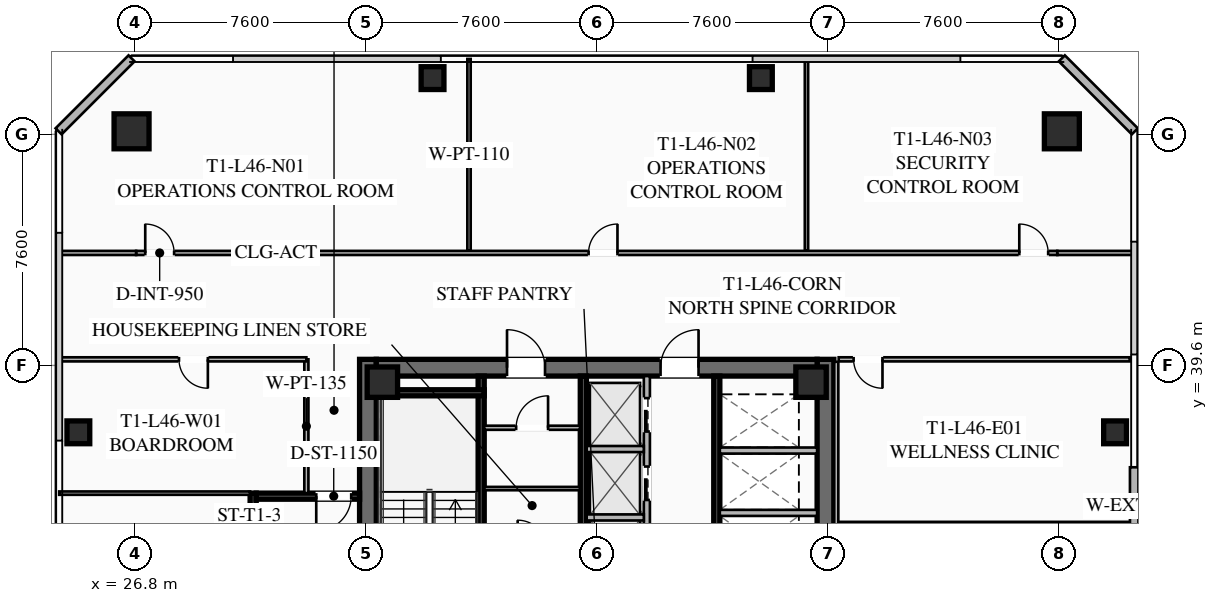
"""IFC4 building model, lengths in metres.
Left out: names, types, materials, properties, quantities, classifications, styles, units other than length and angle.
Written with IfcOpenShell. Run it as: python <this file> out.ifc"""

import sys

from ifc_helpers import new_model, si_unit, direction, frame, frame_2d, origin, origin_2d, place, context, subcontext, project, spatial, rectangle, hollow_rectangle, extrude, element, fill, save


model = new_model("IFC4")
c1 = context("Model", 3, precision=1e-05, world=origin(), true_north=direction((0.0, 1.0)))
c2 = subcontext(c1, "Body", "Model", "MODEL_VIEW")
j1 = project(units=[si_unit("LENGTHUNIT", "METRE"), si_unit("PLANEANGLEUNIT", "RADIAN")], contexts=[c1])
p1 = place(None, origin())
s1 = spatial("IfcSite", under=j1, at=p1, CompositionType="ELEMENT")
p2 = place(p1, origin())
s2 = spatial("IfcBuilding", under=s1, at=p2, CompositionType="ELEMENT")
p3 = place(p2, frame((0.0, 0.0, 171.2)))
s3 = spatial("IfcBuildingStorey", under=s2, at=p3, CompositionType="ELEMENT", Elevation=171.2)
for number, where, z_axis, x_axis in (
    (1, (34.475, 24.2, 0.0), (0.0, 0.0, 1.0), (0.0, 1.0, 0.0)),
    (2, (49.525, 39.8, 0.0), (0.0, 0.0, 1.0), (0.0, -1.0, 0.0)),
):
    element("IfcWall", number, at=place(p3, frame(where, z_axis=z_axis, x_axis=x_axis)), inside=s3, PredefinedType="SHEAR", context=c2, shape_type="SweptSolid", body=[
        extrude(rectangle(XDim=15.6, YDim=0.55, at=frame_2d((7.8, 0.0))), origin(), (0.0, 0.0, 1.0), 3.55),
    ])
p4 = place(p3, frame((34.75, 39.525, 0.0), z_axis=(0.0, 0.0, 1.0), x_axis=(1.0, 0.0, 0.0)))
e3 = element("IfcWall", 3, at=p4, inside=s3, PredefinedType="SHEAR", context=c2, shape_type="SweptSolid", body=[
    extrude(rectangle(XDim=14.5, YDim=0.55, at=frame_2d((7.25, 0.0))), origin(), (0.0, 0.0, 1.0), 3.55),
])
p5 = place(p4, frame((4.3, 0.0, 0.0)))
e4 = element("IfcOpeningElement", 4, at=p5, cuts=e3, PredefinedType="OPENING", context=c2, shape_type="SweptSolid", body=[
    extrude(rectangle(XDim=1.25, YDim=2.25, at=frame_2d((0.625, 1.125))), frame((0.0, 0.285, 0.0), z_axis=(0.0, -1.0, 0.0), x_axis=(1.0, 0.0, 0.0)), (0.0, 0.0, 1.0), 0.57),
])
p6 = place(p4, frame((9.35, 0.0, 0.0)))
e5 = element("IfcOpeningElement", 5, at=p6, cuts=e3, PredefinedType="OPENING", context=c2, shape_type="SweptSolid", body=[
    extrude(rectangle(XDim=1.25, YDim=2.25, at=frame_2d((0.625, 1.125))), frame((0.0, 0.285, 0.0), z_axis=(0.0, -1.0, 0.0), x_axis=(1.0, 0.0, 0.0)), (0.0, 0.0, 1.0), 0.57),
])
for number, where, z_axis, x_axis in (
    (6, (49.05, 39.05, 0.0), (0.0, 0.0, 1.0), (1.0, 0.0, 0.0)),
    (7, (34.95, 39.05, 0.0), (0.0, 0.0, 1.0), (1.0, 0.0, 0.0)),
):
    element("IfcColumn", number, at=place(p3, frame(where, z_axis=z_axis, x_axis=x_axis)), inside=s3, PredefinedType="COLUMN", context=c2, shape_type="SweptSolid", body=[
        extrude(hollow_rectangle(XDim=1.0, YDim=1.0, WallThickness=0.04, at=origin_2d()), origin(), (0.0, 0.0, 1.0), 3.37),
    ])
for number, where, z_axis, x_axis in (
    (8, (57.3, 47.3, 0.0), (0.0, 0.0, 1.0), (1.0, 0.0, 0.0)),
    (9, (26.7, 47.3, 0.0), (0.0, 0.0, 1.0), (1.0, 0.0, 0.0)),
):
    element("IfcColumn", number, at=place(p3, frame(where, z_axis=z_axis, x_axis=x_axis)), inside=s3, PredefinedType="COLUMN", context=c2, shape_type="SweptSolid", body=[
        extrude(hollow_rectangle(XDim=1.15, YDim=1.15, WallThickness=0.045, at=origin_2d()), origin(), (0.0, 0.0, 1.0), 3.37),
    ])
for number, where, z_axis, x_axis in (
    (10, (59.05, 37.4, 0.0), (0.0, 0.0, 1.0), (1.0, 0.0, 0.0)),
    (11, (47.4, 49.05, 0.0), (0.0, 0.0, 1.0), (1.0, 0.0, 0.0)),
    (12, (36.6, 49.05, 0.0), (0.0, 0.0, 1.0), (1.0, 0.0, 0.0)),
    (13, (24.95, 37.4, 0.0), (0.0, 0.0, 1.0), (1.0, 0.0, 0.0)),
):
    element("IfcColumn", number, at=place(p3, frame(where, z_axis=z_axis, x_axis=x_axis)), inside=s3, PredefinedType="COLUMN", context=c2, shape_type="SweptSolid", body=[
        extrude(hollow_rectangle(XDim=0.75, YDim=0.75, WallThickness=0.032, at=origin_2d()), origin(), (0.0, 0.0, 1.0), 3.37),
    ])
p7 = place(p3, frame((59.68, 36.25, 0.0), z_axis=(0.0, 0.0, 1.0), x_axis=(0.0, -1.0, 0.0)))
e14 = element("IfcWall", 14, at=p7, inside=s3, PredefinedType="SOLIDWALL", context=c2, shape_type="SweptSolid", body=[
    extrude(rectangle(XDim=8.5, YDim=0.28, at=frame_2d((4.25, 0.0))), origin(), (0.0, 0.0, 1.0), 3.37),
])
p8 = place(p7, frame((3.6, 0.0, 0.0)))
e15 = element("IfcOpeningElement", 15, at=p8, cuts=e14, PredefinedType="OPENING", context=c2, shape_type="SweptSolid", body=[
    extrude(rectangle(XDim=1.3, YDim=2.15, at=frame_2d((0.65, 1.075))), frame((0.0, 0.15, 0.0), z_axis=(0.0, -1.0, 0.0), x_axis=(1.0, 0.0, 0.0)), (0.0, 0.0, 1.0), 0.3),
])
p9 = place(p7, frame((5.24, 0.0, 0.85)))
e16 = element("IfcOpeningElement", 16, at=p9, cuts=e14, PredefinedType="OPENING", context=c2, shape_type="SweptSolid", body=[
    extrude(rectangle(XDim=1.8, YDim=1.92, at=frame_2d((0.9, 0.96))), frame((0.0, 0.15, 0.0), z_axis=(0.0, -1.0, 0.0), x_axis=(1.0, 0.0, 0.0)), (0.0, 0.0, 1.0), 0.3),
])
for number, where, z_axis, x_axis in (
    (17, (24.3, 47.3, 0.0), (0.0, 0.0, 1.0), (0.707, 0.707, 0.0)),
    (18, (57.3, 49.7, 0.0), (0.0, 0.0, 1.0), (0.707, -0.707, 0.0)),
):
    element("IfcWall", number, at=place(p3, frame(where, z_axis=z_axis, x_axis=x_axis)), inside=s3, PredefinedType="SOLIDWALL", context=c2, shape_type="SweptSolid", body=[
        extrude(rectangle(XDim=3.394, YDim=0.28, at=frame_2d((1.697, 0.0))), origin(), (0.0, 0.0, 1.0), 3.37),
    ])
p10 = place(p3, frame((38.2, 31.2, 0.0), z_axis=(0.0, 0.0, 1.0), x_axis=(0.0, 1.0, 0.0)))
e19 = element("IfcWall", 19, at=p10, inside=s3, PredefinedType="SHEAR", context=c2, shape_type="SweptSolid", body=[
    extrude(rectangle(XDim=8.05, YDim=0.2, at=frame_2d((4.025, 0.0))), origin(), (0.0, 0.0, 1.0), 3.37),
])
p11 = place(p10, frame((0.45, 0.0, 0.0)))
e20 = element("IfcOpeningElement", 20, at=p11, cuts=e19, PredefinedType="OPENING", context=c2, shape_type="SweptSolid", body=[
    extrude(rectangle(XDim=1.15, YDim=2.2, at=frame_2d((0.575, 1.1))), frame((0.0, 0.11, 0.0), z_axis=(0.0, -1.0, 0.0), x_axis=(1.0, 0.0, 0.0)), (0.0, 0.0, 1.0), 0.22),
])
p12 = place(p3, frame((34.75, 38.7, 0.0), z_axis=(0.0, 0.0, 1.0), x_axis=(1.0, 0.0, 0.0)))
e21 = element("IfcWall", 21, at=p12, inside=s3, PredefinedType="SHEAR", context=c2, shape_type="SweptSolid", body=[
    extrude(rectangle(XDim=3.55, YDim=0.2, at=frame_2d((1.775, 0.0))), origin(), (0.0, 0.0, 1.0), 3.37),
])
p13 = place(p3, frame((41.56, 24.75, 0.0), z_axis=(0.0, 0.0, 1.0), x_axis=(0.0, 1.0, 0.0)))
e22 = element("IfcWall", 22, at=p13, inside=s3, PredefinedType="SHEAR", context=c2, shape_type="SweptSolid", body=[
    extrude(rectangle(XDim=14.5, YDim=0.2, at=frame_2d((7.25, 0.0))), origin(), (0.0, 0.0, 1.0), 3.37),
])
p14 = place(p3, frame((45.95, 39.25, 0.0), z_axis=(0.0, 0.0, 1.0), x_axis=(0.0, -1.0, 0.0)))
e23 = element("IfcWall", 23, at=p14, inside=s3, PredefinedType="SHEAR", context=c2, shape_type="SweptSolid", body=[
    extrude(rectangle(XDim=6.45, YDim=0.2, at=frame_2d((3.225, 0.0))), origin(), (0.0, 0.0, 1.0), 3.37),
])
for number, where, z_axis, x_axis in (
    (24, (46.05, 34.75, 0.0), (0.0, 0.0, 1.0), (1.0, 0.0, 0.0)),
    (25, (46.05, 36.8, 0.0), (0.0, 0.0, 1.0), (1.0, 0.0, 0.0)),
):
    element("IfcWall", number, at=place(p3, frame(where, z_axis=z_axis, x_axis=x_axis)), inside=s3, PredefinedType="SOLIDWALL", context=c2, shape_type="SweptSolid", body=[
        extrude(rectangle(XDim=3.2, YDim=0.2, at=frame_2d((1.6, 0.0))), origin(), (0.0, 0.0, 1.0), 3.37),
    ])
p15 = place(p3, frame((38.3, 37.55, 0.0), z_axis=(0.0, 0.0, 1.0), x_axis=(1.0, 0.0, 0.0)))
e26 = element("IfcWall", 26, at=p15, inside=s3, PredefinedType="PARTITIONING", context=c2, shape_type="SweptSolid", body=[
    extrude(rectangle(XDim=3.15, YDim=0.135, at=frame_2d((1.575, 0.0))), origin(), (0.0, 0.0, 1.0), 2.723),
])
p16 = place(p15, frame((1.05, 0.0, 0.0)))
e27 = element("IfcOpeningElement", 27, at=p16, cuts=e26, PredefinedType="OPENING", context=c2, shape_type="SweptSolid", body=[
    extrude(rectangle(XDim=1.05, YDim=2.2, at=frame_2d((0.525, 1.1))), frame((0.0, 0.077, 0.0), z_axis=(0.0, -1.0, 0.0), x_axis=(1.0, 0.0, 0.0)), (0.0, 0.0, 1.0), 0.155),
])
p17 = place(p3, frame((38.3, 35.55, 0.0), z_axis=(0.0, 0.0, 1.0), x_axis=(1.0, 0.0, 0.0)))
e28 = element("IfcWall", 28, at=p17, inside=s3, PredefinedType="PARTITIONING", context=c2, shape_type="SweptSolid", body=[
    extrude(rectangle(XDim=3.15, YDim=0.11, at=frame_2d((1.575, 0.0))), origin(), (0.0, 0.0, 1.0), 2.723),
])
p18 = place(p3, frame((43.65, 32.35, 0.0), z_axis=(0.0, 0.0, 1.0), x_axis=(0.0, 1.0, 0.0)))
e29 = element("IfcWall", 29, at=p18, inside=s3, PredefinedType="SOLIDWALL", context=c2, shape_type="SweptSolid", body=[
    extrude(rectangle(XDim=6.9, YDim=0.2, at=frame_2d((3.45, 0.0))), origin(), (0.0, 0.0, 1.0), 3.37),
])
p19 = place(p18, frame((0.575, 0.0, 0.0)))
e30 = element("IfcOpeningElement", 30, at=p19, cuts=e29, PredefinedType="OPENING", context=c2, shape_type="SweptSolid", body=[
    extrude(rectangle(XDim=1.1, YDim=2.2, at=frame_2d((0.55, 1.1))), frame((0.0, 0.11, 0.0), z_axis=(0.0, -1.0, 0.0), x_axis=(1.0, 0.0, 0.0)), (0.0, 0.0, 1.0), 0.22),
])
p20 = place(p18, frame((2.825, 0.0, 0.0)))
e31 = element("IfcOpeningElement", 31, at=p20, cuts=e29, PredefinedType="OPENING", context=c2, shape_type="SweptSolid", body=[
    extrude(rectangle(XDim=1.1, YDim=2.2, at=frame_2d((0.55, 1.1))), frame((0.0, 0.11, 0.0), z_axis=(0.0, -1.0, 0.0), x_axis=(1.0, 0.0, 0.0)), (0.0, 0.0, 1.0), 0.22),
])
p21 = place(p18, frame((5.075, 0.0, 0.0)))
e32 = element("IfcOpeningElement", 32, at=p21, cuts=e29, PredefinedType="OPENING", context=c2, shape_type="SweptSolid", body=[
    extrude(rectangle(XDim=1.1, YDim=2.2, at=frame_2d((0.55, 1.1))), frame((0.0, 0.11, 0.0), z_axis=(0.0, -1.0, 0.0), x_axis=(1.0, 0.0, 0.0)), (0.0, 0.0, 1.0), 0.22),
])
for number, where, z_axis, x_axis in (
    (33, (41.67, 34.6, 0.0), (0.0, 0.0, 1.0), (1.0, 0.0, 0.0)),
    (34, (41.67, 36.85, 0.0), (0.0, 0.0, 1.0), (1.0, 0.0, 0.0)),
):
    element("IfcWall", number, at=place(p3, frame(where, z_axis=z_axis, x_axis=x_axis)), inside=s3, PredefinedType="SOLIDWALL", context=c2, shape_type="SweptSolid", body=[
        extrude(rectangle(XDim=1.88, YDim=0.2, at=frame_2d((0.94, 0.0))), origin(), (0.0, 0.0, 1.0), 3.37),
    ])
p22 = place(p3, frame((30.7, 28.6, 0.0), z_axis=(0.0, 0.0, 1.0), x_axis=(0.0, 1.0, 0.0)))
e35 = element("IfcWall", 35, at=p22, inside=s3, PredefinedType="SHEAR", context=c2, shape_type="SweptSolid", body=[
    extrude(rectangle(XDim=6.8, YDim=0.2, at=frame_2d((3.4, 0.0))), origin(), (0.0, 0.0, 1.0), 3.37),
])
p23 = place(p3, frame((34.2, 35.3, 0.0), z_axis=(0.0, 0.0, 1.0), x_axis=(-1.0, 0.0, 0.0)))
e36 = element("IfcWall", 36, at=p23, inside=s3, PredefinedType="SHEAR", context=c2, shape_type="SweptSolid", body=[
    extrude(rectangle(XDim=3.4, YDim=0.2, at=frame_2d((1.7, 0.0))), origin(), (0.0, 0.0, 1.0), 3.37),
])
p24 = place(p23, frame((0.275, 0.0, 0.0)))
e37 = element("IfcOpeningElement", 37, at=p24, cuts=e36, PredefinedType="OPENING", context=c2, shape_type="SweptSolid", body=[
    extrude(rectangle(XDim=1.15, YDim=2.2, at=frame_2d((0.575, 1.1))), frame((0.0, 0.11, 0.0), z_axis=(0.0, -1.0, 0.0), x_axis=(1.0, 0.0, 0.0)), (0.0, 0.0, 1.0), 0.22),
])
p25 = place(p3, frame((32.45, 35.4, 0.0), z_axis=(0.0, 0.0, 1.0), x_axis=(0.0, 1.0, 0.0)))
e38 = element("IfcWall", 38, at=p25, inside=s3, PredefinedType="PARTITIONING", context=c2, shape_type="SweptSolid", body=[
    extrude(rectangle(XDim=4.4, YDim=0.135, at=frame_2d((2.2, 0.0))), origin(), (0.0, 0.0, 1.0), 2.723),
])
p26 = place(p3, frame((26.85, 43.3, 0.0), z_axis=(0.0, 0.0, 1.0), x_axis=(1.0, 0.0, 0.0)))
e39 = element("IfcWall", 39, at=p26, inside=s3, PredefinedType="PARTITIONING", context=c2, shape_type="SweptSolid", body=[
    extrude(rectangle(XDim=30.3, YDim=0.135, at=frame_2d((15.15, 0.0))), origin(), (0.0, 0.0, 1.0), 2.723),
])
p27 = place(p26, frame((0.3, 0.0, 0.0)))
e40 = element("IfcOpeningElement", 40, at=p27, cuts=e39, PredefinedType="OPENING", context=c2, shape_type="SweptSolid", body=[
    extrude(rectangle(XDim=0.95, YDim=2.05, at=frame_2d((0.475, 1.025))), frame((0.0, 0.077, 0.0), z_axis=(0.0, -1.0, 0.0), x_axis=(1.0, 0.0, 0.0)), (0.0, 0.0, 1.0), 0.155),
])
p28 = place(p26, frame((14.883, 0.0, 0.0)))
e41 = element("IfcOpeningElement", 41, at=p28, cuts=e39, PredefinedType="OPENING", context=c2, shape_type="SweptSolid", body=[
    extrude(rectangle(XDim=0.95, YDim=2.05, at=frame_2d((0.475, 1.025))), frame((0.0, 0.077, 0.0), z_axis=(0.0, -1.0, 0.0), x_axis=(1.0, 0.0, 0.0)), (0.0, 0.0, 1.0), 0.155),
])
p29 = place(p26, frame((29.05, 0.0, 0.0)))
e42 = element("IfcOpeningElement", 42, at=p29, cuts=e39, PredefinedType="OPENING", context=c2, shape_type="SweptSolid", body=[
    extrude(rectangle(XDim=0.95, YDim=2.05, at=frame_2d((0.475, 1.025))), frame((0.0, 0.077, 0.0), z_axis=(0.0, -1.0, 0.0), x_axis=(1.0, 0.0, 0.0)), (0.0, 0.0, 1.0), 0.155),
])
for number, where, z_axis, x_axis in (
    (43, (24.32, 43.3, 0.0), (0.0, 0.0, 1.0), (1.0, 0.0, 0.0)),
    (44, (57.15, 43.3, 0.0), (0.0, 0.0, 1.0), (1.0, 0.0, 0.0)),
):
    element("IfcWall", number, at=place(p3, frame(where, z_axis=z_axis, x_axis=x_axis)), inside=s3, PredefinedType="PARTITIONING", context=c2, shape_type="SweptSolid", body=[
        extrude(rectangle(XDim=2.53, YDim=0.135, at=frame_2d((1.265, 0.0))), origin(), (0.0, 0.0, 1.0), 2.723),
    ])
for number, where, z_axis, x_axis in (
    (45, (37.8, 43.38, 0.0), (0.0, 0.0, 1.0), (0.0, 1.0, 0.0)),
    (46, (48.9, 43.38, 0.0), (0.0, 0.0, 1.0), (0.0, 1.0, 0.0)),
):
    element("IfcWall", number, at=place(p3, frame(where, z_axis=z_axis, x_axis=x_axis)), inside=s3, PredefinedType="PARTITIONING", context=c2, shape_type="SweptSolid", body=[
        extrude(rectangle(XDim=6.3, YDim=0.11, at=frame_2d((3.15, 0.0))), origin(), (0.0, 0.0, 1.0), 2.723),
    ])
p30 = place(p3, frame((49.88, 39.72, 0.0), z_axis=(0.0, 0.0, 1.0), x_axis=(0.0, -1.0, 0.0)))
e47 = element("IfcWall", 47, at=p30, inside=s3, PredefinedType="PARTITIONING", context=c2, shape_type="SweptSolid", body=[
    extrude(rectangle(XDim=15.44, YDim=0.135, at=frame_2d((7.72, 0.0))), origin(), (0.0, 0.0, 1.0), 2.723),
])
p31 = place(p3, frame((59.53, 39.8, 0.0), z_axis=(0.0, 0.0, 1.0), x_axis=(-1.0, 0.0, 0.0)))
e48 = element("IfcWall", 48, at=p31, inside=s3, PredefinedType="PARTITIONING", context=c2, shape_type="SweptSolid", body=[
    extrude(rectangle(XDim=9.57, YDim=0.135, at=frame_2d((4.785, 0.0))), origin(), (0.0, 0.0, 1.0), 2.723),
])
p32 = place(p31, frame((8.13, 0.0, 0.0)))
e49 = element("IfcOpeningElement", 49, at=p32, cuts=e48, PredefinedType="OPENING", context=c2, shape_type="SweptSolid", body=[
    extrude(rectangle(XDim=0.95, YDim=2.05, at=frame_2d((0.475, 1.025))), frame((0.0, 0.077, 0.0), z_axis=(0.0, -1.0, 0.0), x_axis=(1.0, 0.0, 0.0)), (0.0, 0.0, 1.0), 0.155),
])
p33 = place(p3, frame((49.96, 34.4, 0.0), z_axis=(0.0, 0.0, 1.0), x_axis=(1.0, 0.0, 0.0)))
e50 = element("IfcWall", 50, at=p33, inside=s3, PredefinedType="PARTITIONING", context=c2, shape_type="SweptSolid", body=[
    extrude(rectangle(XDim=9.57, YDim=0.11, at=frame_2d((4.785, 0.0))), origin(), (0.0, 0.0, 1.0), 2.723),
])
p34 = place(p3, frame((32.45, 39.8, 0.0), z_axis=(0.0, 0.0, 1.0), x_axis=(-1.0, 0.0, 0.0)))
e51 = element("IfcWall", 51, at=p34, inside=s3, PredefinedType="PARTITIONING", context=c2, shape_type="SweptSolid", body=[
    extrude(rectangle(XDim=8.13, YDim=0.135, at=frame_2d((4.065, 0.0))), origin(), (0.0, 0.0, 1.0), 2.723),
])
p35 = place(p34, frame((3.24, 0.0, 0.0)))
e52 = element("IfcOpeningElement", 52, at=p35, cuts=e51, PredefinedType="OPENING", context=c2, shape_type="SweptSolid", body=[
    extrude(rectangle(XDim=0.95, YDim=2.05, at=frame_2d((0.475, 1.025))), frame((0.0, 0.077, 0.0), z_axis=(0.0, -1.0, 0.0), x_axis=(1.0, 0.0, 0.0)), (0.0, 0.0, 1.0), 0.155),
])
p36 = place(p3, frame((30.6, 35.4, 0.0), z_axis=(0.0, 0.0, 1.0), x_axis=(-1.0, 0.0, 0.0)))
e53 = element("IfcWall", 53, at=p36, inside=s3, PredefinedType="PARTITIONING", context=c2, shape_type="SweptSolid", body=[
    extrude(rectangle(XDim=6.28, YDim=0.11, at=frame_2d((3.14, 0.0))), origin(), (0.0, 0.0, 1.0), 2.723),
])
p37 = place(p5, origin())
e54 = element("IfcDoor", 54, at=p37, inside=s3, OperationType="SINGLE_SWING_LEFT", PredefinedType="DOOR", context=c2, shape_type="SweptSolid", body=[
    extrude(rectangle(XDim=1.25, YDim=2.25, at=frame_2d((0.625, 1.125))), frame((0.0, 0.025, 0.0), z_axis=(0.0, -1.0, 0.0), x_axis=(1.0, 0.0, 0.0)), (0.0, 0.0, 1.0), 0.05),
])
fill(e4, e54)
p38 = place(p6, origin())
e55 = element("IfcDoor", 55, at=p38, inside=s3, OperationType="SINGLE_SWING_RIGHT", PredefinedType="DOOR", context=c2, shape_type="SweptSolid", body=[
    extrude(rectangle(XDim=1.25, YDim=2.25, at=frame_2d((0.625, 1.125))), frame((0.0, 0.025, 0.0), z_axis=(0.0, -1.0, 0.0), x_axis=(1.0, 0.0, 0.0)), (0.0, 0.0, 1.0), 0.05),
])
fill(e5, e55)
p39 = place(p16, origin())
e56 = element("IfcDoor", 56, at=p39, inside=s3, OperationType="SINGLE_SWING_RIGHT", PredefinedType="DOOR", context=c2, shape_type="SweptSolid", body=[
    extrude(rectangle(XDim=1.05, YDim=2.2, at=frame_2d((0.525, 1.1))), frame((0.0, 0.025, 0.0), z_axis=(0.0, -1.0, 0.0), x_axis=(1.0, 0.0, 0.0)), (0.0, 0.0, 1.0), 0.05),
])
fill(e27, e56)
p40 = place(p24, origin())
e57 = element("IfcDoor", 57, at=p40, inside=s3, OperationType="SINGLE_SWING_RIGHT", PredefinedType="DOOR", context=c2, shape_type="SweptSolid", body=[
    extrude(rectangle(XDim=1.15, YDim=2.2, at=frame_2d((0.575, 1.1))), frame((0.0, 0.025, 0.0), z_axis=(0.0, -1.0, 0.0), x_axis=(1.0, 0.0, 0.0)), (0.0, 0.0, 1.0), 0.05),
])
fill(e37, e57)
p41 = place(p27, origin())
e58 = element("IfcDoor", 58, at=p41, inside=s3, OperationType="SINGLE_SWING_LEFT", PredefinedType="DOOR", context=c2, shape_type="SweptSolid", body=[
    extrude(rectangle(XDim=0.95, YDim=2.05, at=frame_2d((0.475, 1.025))), frame((0.0, 0.025, 0.0), z_axis=(0.0, -1.0, 0.0), x_axis=(1.0, 0.0, 0.0)), (0.0, 0.0, 1.0), 0.05),
])
fill(e40, e58)
p42 = place(p28, origin())
e59 = element("IfcDoor", 59, at=p42, inside=s3, OperationType="SINGLE_SWING_RIGHT", PredefinedType="DOOR", context=c2, shape_type="SweptSolid", body=[
    extrude(rectangle(XDim=0.95, YDim=2.05, at=frame_2d((0.475, 1.025))), frame((0.0, 0.025, 0.0), z_axis=(0.0, -1.0, 0.0), x_axis=(1.0, 0.0, 0.0)), (0.0, 0.0, 1.0), 0.05),
])
fill(e41, e59)
p43 = place(p29, origin())
e60 = element("IfcDoor", 60, at=p43, inside=s3, OperationType="SINGLE_SWING_LEFT", PredefinedType="DOOR", context=c2, shape_type="SweptSolid", body=[
    extrude(rectangle(XDim=0.95, YDim=2.05, at=frame_2d((0.475, 1.025))), frame((0.0, 0.025, 0.0), z_axis=(0.0, -1.0, 0.0), x_axis=(1.0, 0.0, 0.0)), (0.0, 0.0, 1.0), 0.05),
])
fill(e42, e60)
p44 = place(p32, origin())
e61 = element("IfcDoor", 61, at=p44, inside=s3, OperationType="SINGLE_SWING_LEFT", PredefinedType="DOOR", context=c2, shape_type="SweptSolid", body=[
    extrude(rectangle(XDim=0.95, YDim=2.05, at=frame_2d((0.475, 1.025))), frame((0.0, 0.025, 0.0), z_axis=(0.0, -1.0, 0.0), x_axis=(1.0, 0.0, 0.0)), (0.0, 0.0, 1.0), 0.05),
])
fill(e49, e61)
p45 = place(p35, origin())
e62 = element("IfcDoor", 62, at=p45, inside=s3, OperationType="SINGLE_SWING_LEFT", PredefinedType="DOOR", context=c2, shape_type="SweptSolid", body=[
    extrude(rectangle(XDim=0.95, YDim=2.05, at=frame_2d((0.475, 1.025))), frame((0.0, 0.025, 0.0), z_axis=(0.0, -1.0, 0.0), x_axis=(1.0, 0.0, 0.0)), (0.0, 0.0, 1.0), 0.05),
])
fill(e52, e62)
p46 = place(p20, origin())
e63 = element("IfcDoor", 63, at=p46, inside=s3, OperationType="SLIDING_TO_LEFT", PredefinedType="DOOR", context=c2, shape_type="SweptSolid", body=[
    extrude(rectangle(XDim=1.1, YDim=2.2, at=frame_2d((0.55, 1.1))), frame((0.0, 0.025, 0.0), z_axis=(0.0, -1.0, 0.0), x_axis=(1.0, 0.0, 0.0)), (0.0, 0.0, 1.0), 0.05),
])
fill(e31, e63)
p47 = place(p21, origin())
e64 = element("IfcDoor", 64, at=p47, inside=s3, OperationType="SLIDING_TO_LEFT", PredefinedType="DOOR", context=c2, shape_type="SweptSolid", body=[
    extrude(rectangle(XDim=1.1, YDim=2.2, at=frame_2d((0.55, 1.1))), frame((0.0, 0.025, 0.0), z_axis=(0.0, -1.0, 0.0), x_axis=(1.0, 0.0, 0.0)), (0.0, 0.0, 1.0), 0.05),
])
fill(e32, e64)
save(model, sys.argv[1])
